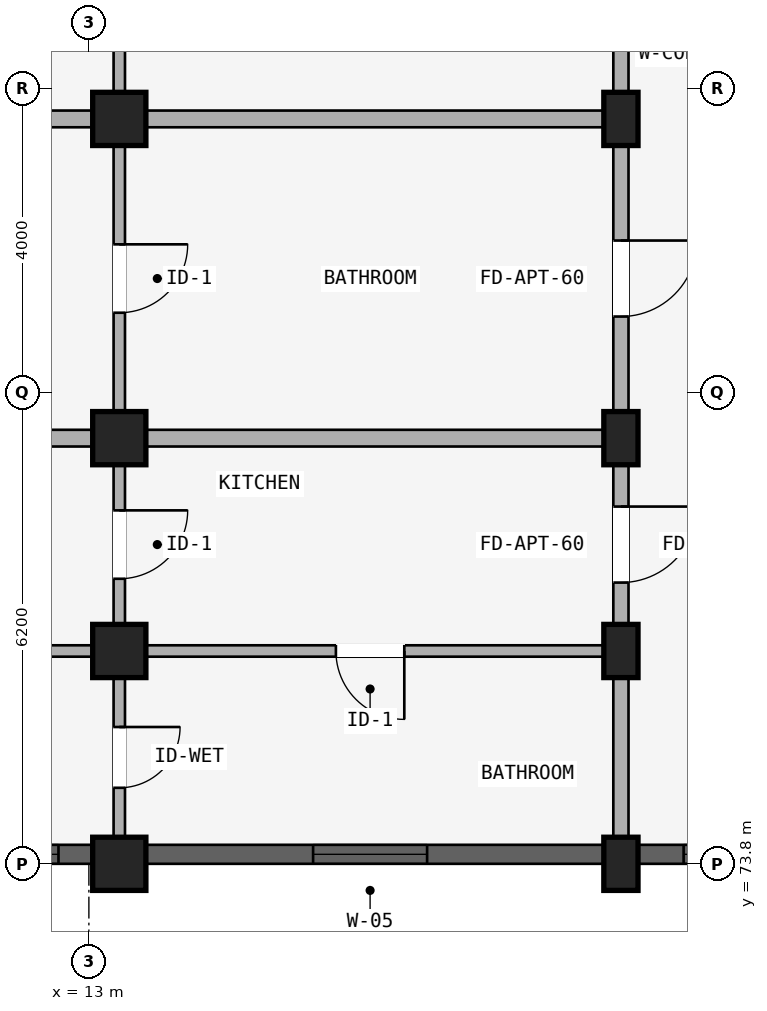
"""IFC4 building model, lengths in metres.
Left out: names, types, materials, properties, quantities, classifications, styles, units other than length and angle.
Written with IfcOpenShell. Run it as: python <this file> out.ifc"""

import sys

from ifc_helpers import new_model, si_unit, direction, frame, frame_2d, origin, origin_2d, place, context, subcontext, project, spatial, rectangle, extrude, element, fill, save


model = new_model("IFC4")
c1 = context("Model", 3, precision=1e-05, world=origin(), true_north=direction((0.0, 1.0)))
c2 = subcontext(c1, "Body", "Model", "MODEL_VIEW")
j1 = project(units=[si_unit("LENGTHUNIT", "METRE"), si_unit("PLANEANGLEUNIT", "RADIAN")], contexts=[c1])
p1 = place(None, origin())
s1 = spatial("IfcSite", under=j1, at=p1, CompositionType="ELEMENT")
p2 = place(p1, origin())
s2 = spatial("IfcBuilding", under=s1, at=p2, CompositionType="ELEMENT")
p3 = place(p2, frame((0.0, 0.0, 18.15)))
s3 = spatial("IfcBuildingStorey", under=s2, at=p3, CompositionType="ELEMENT", Elevation=18.15)
p4 = place(p3, frame((20.0, 83.6, 0.0), z_axis=(0.0, 0.0, 1.0), x_axis=(1.0, 0.0, 0.0)))
e1 = element("IfcColumn", 1, at=p4, inside=s3, PredefinedType="COLUMN", context=c2, shape_type="SweptSolid", body=[
    extrude(rectangle(XDim=0.45, YDim=0.7, at=origin_2d()), origin(), (0.0, 0.0, 1.0), 2.93),
])
p5 = place(p3, frame((13.4, 83.6, 0.0), z_axis=(0.0, 0.0, 1.0), x_axis=(1.0, 0.0, 0.0)))
e2 = element("IfcColumn", 2, at=p5, inside=s3, PredefinedType="COLUMN", context=c2, shape_type="SweptSolid", body=[
    extrude(rectangle(XDim=0.7, YDim=0.7, at=origin_2d()), origin(), (0.0, 0.0, 1.0), 2.93),
])
p6 = place(p3, frame((20.0, 79.4, 0.0), z_axis=(0.0, 0.0, 1.0), x_axis=(1.0, 0.0, 0.0)))
e3 = element("IfcColumn", 3, at=p6, inside=s3, PredefinedType="COLUMN", context=c2, shape_type="SweptSolid", body=[
    extrude(rectangle(XDim=0.45, YDim=0.7, at=origin_2d()), origin(), (0.0, 0.0, 1.0), 2.93),
])
p7 = place(p3, frame((13.4, 79.4, 0.0), z_axis=(0.0, 0.0, 1.0), x_axis=(1.0, 0.0, 0.0)))
e4 = element("IfcColumn", 4, at=p7, inside=s3, PredefinedType="COLUMN", context=c2, shape_type="SweptSolid", body=[
    extrude(rectangle(XDim=0.7, YDim=0.7, at=origin_2d()), origin(), (0.0, 0.0, 1.0), 2.93),
])
p8 = place(p3, frame((20.0, 76.6, 0.0), z_axis=(0.0, 0.0, 1.0), x_axis=(1.0, 0.0, 0.0)))
e5 = element("IfcColumn", 5, at=p8, inside=s3, PredefinedType="COLUMN", context=c2, shape_type="SweptSolid", body=[
    extrude(rectangle(XDim=0.45, YDim=0.7, at=origin_2d()), origin(), (0.0, 0.0, 1.0), 2.93),
])
p9 = place(p3, frame((13.4, 76.6, 0.0), z_axis=(0.0, 0.0, 1.0), x_axis=(1.0, 0.0, 0.0)))
e6 = element("IfcColumn", 6, at=p9, inside=s3, PredefinedType="COLUMN", context=c2, shape_type="SweptSolid", body=[
    extrude(rectangle(XDim=0.7, YDim=0.7, at=origin_2d()), origin(), (0.0, 0.0, 1.0), 2.93),
])
p10 = place(p3, frame((20.0, 73.8, 0.0), z_axis=(0.0, 0.0, 1.0), x_axis=(1.0, 0.0, 0.0)))
e7 = element("IfcColumn", 7, at=p10, inside=s3, PredefinedType="COLUMN", context=c2, shape_type="SweptSolid", body=[
    extrude(rectangle(XDim=0.45, YDim=0.7, at=origin_2d()), origin(), (0.0, 0.0, 1.0), 2.93),
])
p11 = place(p3, frame((13.4, 73.8, 0.0), z_axis=(0.0, 0.0, 1.0), x_axis=(1.0, 0.0, 0.0)))
e8 = element("IfcColumn", 8, at=p11, inside=s3, PredefinedType="COLUMN", context=c2, shape_type="SweptSolid", body=[
    extrude(rectangle(XDim=0.7, YDim=0.7, at=origin_2d()), origin(), (0.0, 0.0, 1.0), 2.93),
])
p12 = place(p3, frame((20.0, 87.65, 0.0), z_axis=(0.0, 0.0, 1.0), x_axis=(0.0, -1.0, 0.0)))
e9 = element("IfcWall", 9, at=p12, inside=s3, PredefinedType="STANDARD", context=c2, shape_type="SweptSolid", body=[
    extrude(rectangle(XDim=4.05, YDim=0.2, at=frame_2d((2.025, 0.0))), origin(), (0.0, 0.0, 1.0), 2.372),
])
p13 = place(p12, frame((1.525, 0.0, 0.0)))
e10 = element("IfcOpeningElement", 10, at=p13, cuts=e9, PredefinedType="OPENING", context=c2, shape_type="SweptSolid", body=[
    extrude(rectangle(XDim=1.0, YDim=2.15, at=frame_2d((0.5, 1.075))), frame((0.0, 0.11, 0.0), z_axis=(0.0, -1.0, 0.0), x_axis=(1.0, 0.0, 0.0)), (0.0, 0.0, 1.0), 0.22),
])
p14 = place(p3, frame((13.4, 87.57, 0.0), z_axis=(0.0, 0.0, 1.0), x_axis=(0.0, -1.0, 0.0)))
e11 = element("IfcWall", 11, at=p14, inside=s3, PredefinedType="PARTITIONING", context=c2, shape_type="SweptSolid", body=[
    extrude(rectangle(XDim=3.89, YDim=0.15, at=frame_2d((1.945, 0.0))), origin(), (0.0, 0.0, 1.0), 2.372),
])
p15 = place(p14, frame((1.495, 0.0, 0.0)))
e12 = element("IfcOpeningElement", 12, at=p15, cuts=e11, PredefinedType="OPENING", context=c2, shape_type="SweptSolid", body=[
    extrude(rectangle(XDim=0.9, YDim=2.1, at=frame_2d((0.45, 1.05))), frame((0.0, 0.085, 0.0), z_axis=(0.0, -1.0, 0.0), x_axis=(1.0, 0.0, 0.0)), (0.0, 0.0, 1.0), 0.17),
])
p16 = place(p3, frame((20.0, 83.6, 0.0), z_axis=(0.0, 0.0, 1.0), x_axis=(0.0, -1.0, 0.0)))
e13 = element("IfcWall", 13, at=p16, inside=s3, PredefinedType="STANDARD", context=c2, shape_type="SweptSolid", body=[
    extrude(rectangle(XDim=4.2, YDim=0.2, at=frame_2d((2.1, 0.0))), origin(), (0.0, 0.0, 1.0), 2.372),
])
p17 = place(p16, frame((1.6, 0.0, 0.0)))
e14 = element("IfcOpeningElement", 14, at=p17, cuts=e13, PredefinedType="OPENING", context=c2, shape_type="SweptSolid", body=[
    extrude(rectangle(XDim=1.0, YDim=2.15, at=frame_2d((0.5, 1.075))), frame((0.0, 0.11, 0.0), z_axis=(0.0, -1.0, 0.0), x_axis=(1.0, 0.0, 0.0)), (0.0, 0.0, 1.0), 0.22),
])
p18 = place(p3, frame((13.4, 83.52, 0.0), z_axis=(0.0, 0.0, 1.0), x_axis=(0.0, -1.0, 0.0)))
e15 = element("IfcWall", 15, at=p18, inside=s3, PredefinedType="PARTITIONING", context=c2, shape_type="SweptSolid", body=[
    extrude(rectangle(XDim=4.04, YDim=0.15, at=frame_2d((2.02, 0.0))), origin(), (0.0, 0.0, 1.0), 2.372),
])
p19 = place(p18, frame((1.57, 0.0, 0.0)))
e16 = element("IfcOpeningElement", 16, at=p19, cuts=e15, PredefinedType="OPENING", context=c2, shape_type="SweptSolid", body=[
    extrude(rectangle(XDim=0.9, YDim=2.1, at=frame_2d((0.45, 1.05))), frame((0.0, 0.085, 0.0), z_axis=(0.0, -1.0, 0.0), x_axis=(1.0, 0.0, 0.0)), (0.0, 0.0, 1.0), 0.17),
])
p20 = place(p3, frame((19.95, 83.6, 0.0), z_axis=(0.0, 0.0, 1.0), x_axis=(-1.0, 0.0, 0.0)))
e17 = element("IfcWall", 17, at=p20, inside=s3, PredefinedType="STANDARD", context=c2, shape_type="SweptSolid", body=[
    extrude(rectangle(XDim=17.53, YDim=0.22, at=frame_2d((8.765, 0.0))), origin(), (0.0, 0.0, 1.0), 2.372),
])
p21 = place(p3, frame((20.0, 79.4, 0.0), z_axis=(0.0, 0.0, 1.0), x_axis=(0.0, -1.0, 0.0)))
e18 = element("IfcWall", 18, at=p21, inside=s3, PredefinedType="STANDARD", context=c2, shape_type="SweptSolid", body=[
    extrude(rectangle(XDim=2.8, YDim=0.2, at=frame_2d((1.4, 0.0))), origin(), (0.0, 0.0, 1.0), 2.372),
])
p22 = place(p21, frame((0.9, 0.0, 0.0)))
e19 = element("IfcOpeningElement", 19, at=p22, cuts=e18, PredefinedType="OPENING", context=c2, shape_type="SweptSolid", body=[
    extrude(rectangle(XDim=1.0, YDim=2.15, at=frame_2d((0.5, 1.075))), frame((0.0, 0.11, 0.0), z_axis=(0.0, -1.0, 0.0), x_axis=(1.0, 0.0, 0.0)), (0.0, 0.0, 1.0), 0.22),
])
p23 = place(p3, frame((13.4, 79.32, 0.0), z_axis=(0.0, 0.0, 1.0), x_axis=(0.0, -1.0, 0.0)))
e20 = element("IfcWall", 20, at=p23, inside=s3, PredefinedType="PLUMBINGWALL", context=c2, shape_type="SweptSolid", body=[
    extrude(rectangle(XDim=2.64, YDim=0.15, at=frame_2d((1.32, 0.0))), origin(), (0.0, 0.0, 1.0), 2.372),
])
p24 = place(p23, frame((0.87, 0.0, 0.0)))
e21 = element("IfcOpeningElement", 21, at=p24, cuts=e20, PredefinedType="OPENING", context=c2, shape_type="SweptSolid", body=[
    extrude(rectangle(XDim=0.9, YDim=2.1, at=frame_2d((0.45, 1.05))), frame((0.0, 0.085, 0.0), z_axis=(0.0, -1.0, 0.0), x_axis=(1.0, 0.0, 0.0)), (0.0, 0.0, 1.0), 0.17),
])
p25 = place(p3, frame((19.9, 79.4, 0.0), z_axis=(0.0, 0.0, 1.0), x_axis=(-1.0, 0.0, 0.0)))
e22 = element("IfcWall", 22, at=p25, inside=s3, PredefinedType="STANDARD", context=c2, shape_type="SweptSolid", body=[
    extrude(rectangle(XDim=17.42, YDim=0.22, at=frame_2d((8.71, 0.0))), origin(), (0.0, 0.0, 1.0), 2.372),
])
p26 = place(p3, frame((20.0, 76.6, 0.0), z_axis=(0.0, 0.0, 1.0), x_axis=(0.0, -1.0, 0.0)))
e23 = element("IfcWall", 23, at=p26, inside=s3, PredefinedType="STANDARD", context=c2, shape_type="SweptSolid", body=[
    extrude(rectangle(XDim=2.8, YDim=0.2, at=frame_2d((1.4, 0.0))), origin(), (0.0, 0.0, 1.0), 2.372),
])
p27 = place(p3, frame((13.4, 76.52, 0.0), z_axis=(0.0, 0.0, 1.0), x_axis=(0.0, -1.0, 0.0)))
e24 = element("IfcWall", 24, at=p27, inside=s3, PredefinedType="PLUMBINGWALL", context=c2, shape_type="SweptSolid", body=[
    extrude(rectangle(XDim=2.64, YDim=0.15, at=frame_2d((1.32, 0.0))), origin(), (0.0, 0.0, 1.0), 2.372),
])
p28 = place(p27, frame((0.92, 0.0, 0.0)))
e25 = element("IfcOpeningElement", 25, at=p28, cuts=e24, PredefinedType="OPENING", context=c2, shape_type="SweptSolid", body=[
    extrude(rectangle(XDim=0.8, YDim=2.1, at=frame_2d((0.4, 1.05))), frame((0.0, 0.085, 0.0), z_axis=(0.0, -1.0, 0.0), x_axis=(1.0, 0.0, 0.0)), (0.0, 0.0, 1.0), 0.17),
])
p29 = place(p3, frame((19.9, 76.6, 0.0), z_axis=(0.0, 0.0, 1.0), x_axis=(-1.0, 0.0, 0.0)))
e26 = element("IfcWall", 26, at=p29, inside=s3, PredefinedType="PARTITIONING", context=c2, shape_type="SweptSolid", body=[
    extrude(rectangle(XDim=17.42, YDim=0.15, at=frame_2d((8.71, 0.0))), origin(), (0.0, 0.0, 1.0), 2.372),
])
p30 = place(p29, frame((2.75, 0.0, 0.0)))
e27 = element("IfcOpeningElement", 27, at=p30, cuts=e26, PredefinedType="OPENING", context=c2, shape_type="SweptSolid", body=[
    extrude(rectangle(XDim=0.9, YDim=2.1, at=frame_2d((0.45, 1.05))), frame((0.0, 0.085, 0.0), z_axis=(0.0, -1.0, 0.0), x_axis=(1.0, 0.0, 0.0)), (0.0, 0.0, 1.0), 0.17),
])
p31 = place(p3, frame((22.171, 73.925, 0.0), z_axis=(0.0, 0.0, 1.0), x_axis=(-1.0, 0.0, 0.0)))
e28 = element("IfcWall", 28, at=p31, inside=s3, PredefinedType="STANDARD", context=c2, shape_type="SweptSolid", body=[
    extrude(rectangle(XDim=1.943, YDim=0.25, at=frame_2d((0.971, 0.0))), origin(), (0.0, 0.0, 1.0), 2.372),
])
p32 = place(p31, frame((0.596, 0.0, 0.88)))
e29 = element("IfcOpeningElement", 29, at=p32, cuts=e28, PredefinedType="OPENING", context=c2, shape_type="SweptSolid", body=[
    extrude(rectangle(XDim=0.75, YDim=1.05, at=frame_2d((0.375, 0.525))), frame((0.0, 0.135, 0.0), z_axis=(0.0, -1.0, 0.0), x_axis=(1.0, 0.0, 0.0)), (0.0, 0.0, 1.0), 0.27),
])
p33 = place(p3, frame((19.771, 73.925, 0.0), z_axis=(0.0, 0.0, 1.0), x_axis=(-1.0, 0.0, 0.0)))
e30 = element("IfcWall", 30, at=p33, inside=s3, PredefinedType="STANDARD", context=c2, shape_type="SweptSolid", body=[
    extrude(rectangle(XDim=6.018, YDim=0.25, at=frame_2d((3.009, 0.0))), origin(), (0.0, 0.0, 1.0), 2.372),
])
p34 = place(p33, frame((2.322, 0.0, 0.522)))
e31 = element("IfcOpeningElement", 31, at=p34, cuts=e30, PredefinedType="OPENING", context=c2, shape_type="SweptSolid", body=[
    extrude(rectangle(XDim=1.5, YDim=1.65, at=frame_2d((0.75, 0.825))), frame((0.0, 0.135, 0.0), z_axis=(0.0, -1.0, 0.0), x_axis=(1.0, 0.0, 0.0)), (0.0, 0.0, 1.0), 0.27),
])
p35 = place(p3, frame((13.046, 73.925, 0.0), z_axis=(0.0, 0.0, 1.0), x_axis=(-1.0, 0.0, 0.0)))
e32 = element("IfcWall", 32, at=p35, inside=s3, PredefinedType="STANDARD", context=c2, shape_type="SweptSolid", body=[
    extrude(rectangle(XDim=2.093, YDim=0.25, at=frame_2d((1.046, 0.0))), origin(), (0.0, 0.0, 1.0), 2.372),
])
p36 = place(p35, frame((0.447, 0.0, 0.672)))
e33 = element("IfcOpeningElement", 33, at=p36, cuts=e32, PredefinedType="OPENING", context=c2, shape_type="SweptSolid", body=[
    extrude(rectangle(XDim=1.2, YDim=1.5, at=frame_2d((0.6, 0.75))), frame((0.0, 0.135, 0.0), z_axis=(0.0, -1.0, 0.0), x_axis=(1.0, 0.0, 0.0)), (0.0, 0.0, 1.0), 0.27),
])
p37 = place(p32, origin())
e34 = element("IfcWindow", 34, at=p37, inside=s3, PartitioningType="SINGLE_PANEL", PredefinedType="WINDOW", context=c2, shape_type="SweptSolid", body=[
    extrude(rectangle(XDim=0.75, YDim=1.05, at=frame_2d((0.375, 0.525))), frame((0.0, 0.03, 0.0), z_axis=(0.0, -1.0, 0.0), x_axis=(1.0, 0.0, 0.0)), (0.0, 0.0, 1.0), 0.06),
])
fill(e29, e34)
p38 = place(p34, origin())
e35 = element("IfcWindow", 35, at=p38, inside=s3, PartitioningType="DOUBLE_PANEL_VERTICAL", PredefinedType="WINDOW", context=c2, shape_type="SweptSolid", body=[
    extrude(rectangle(XDim=1.5, YDim=1.65, at=frame_2d((0.75, 0.825))), frame((0.0, 0.03, 0.0), z_axis=(0.0, -1.0, 0.0), x_axis=(1.0, 0.0, 0.0)), (0.0, 0.0, 1.0), 0.06),
])
fill(e31, e35)
p39 = place(p36, origin())
e36 = element("IfcWindow", 36, at=p39, inside=s3, PartitioningType="SINGLE_PANEL", PredefinedType="WINDOW", context=c2, shape_type="SweptSolid", body=[
    extrude(rectangle(XDim=1.2, YDim=1.5, at=frame_2d((0.6, 0.75))), frame((0.0, 0.03, 0.0), z_axis=(0.0, -1.0, 0.0), x_axis=(1.0, 0.0, 0.0)), (0.0, 0.0, 1.0), 0.06),
])
fill(e33, e36)
p40 = place(p17, origin())
e37 = element("IfcDoor", 37, at=p40, inside=s3, OperationType="SINGLE_SWING_LEFT", PredefinedType="DOOR", context=c2, shape_type="SweptSolid", body=[
    extrude(rectangle(XDim=1.0, YDim=2.15, at=frame_2d((0.5, 1.075))), frame((0.0, 0.025, 0.0), z_axis=(0.0, -1.0, 0.0), x_axis=(1.0, 0.0, 0.0)), (0.0, 0.0, 1.0), 0.05),
])
fill(e14, e37)
p41 = place(p19, frame((0.9, 0.0, 0.0), z_axis=(0.0, 0.0, 1.0), x_axis=(-1.0, 0.0, 0.0)))
e38 = element("IfcDoor", 38, at=p41, inside=s3, OperationType="SINGLE_SWING_RIGHT", PredefinedType="DOOR", context=c2, shape_type="SweptSolid", body=[
    extrude(rectangle(XDim=0.9, YDim=2.1, at=frame_2d((0.45, 1.05))), frame((0.0, 0.025, 0.0), z_axis=(0.0, -1.0, 0.0), x_axis=(1.0, 0.0, 0.0)), (0.0, 0.0, 1.0), 0.05),
])
fill(e16, e38)
p42 = place(p24, frame((0.9, 0.0, 0.0), z_axis=(0.0, 0.0, 1.0), x_axis=(-1.0, 0.0, 0.0)))
e39 = element("IfcDoor", 39, at=p42, inside=s3, OperationType="SINGLE_SWING_RIGHT", PredefinedType="DOOR", context=c2, shape_type="SweptSolid", body=[
    extrude(rectangle(XDim=0.9, YDim=2.1, at=frame_2d((0.45, 1.05))), frame((0.0, 0.025, 0.0), z_axis=(0.0, -1.0, 0.0), x_axis=(1.0, 0.0, 0.0)), (0.0, 0.0, 1.0), 0.05),
])
fill(e21, e39)
p43 = place(p22, origin())
e40 = element("IfcDoor", 40, at=p43, inside=s3, OperationType="SINGLE_SWING_LEFT", PredefinedType="DOOR", context=c2, shape_type="SweptSolid", body=[
    extrude(rectangle(XDim=1.0, YDim=2.15, at=frame_2d((0.5, 1.075))), frame((0.0, 0.025, 0.0), z_axis=(0.0, -1.0, 0.0), x_axis=(1.0, 0.0, 0.0)), (0.0, 0.0, 1.0), 0.05),
])
fill(e19, e40)
p44 = place(p28, frame((0.8, 0.0, 0.0), z_axis=(0.0, 0.0, 1.0), x_axis=(-1.0, 0.0, 0.0)))
e41 = element("IfcDoor", 41, at=p44, inside=s3, OperationType="SINGLE_SWING_RIGHT", PredefinedType="DOOR", context=c2, shape_type="SweptSolid", body=[
    extrude(rectangle(XDim=0.8, YDim=2.1, at=frame_2d((0.4, 1.05))), frame((0.0, 0.025, 0.0), z_axis=(0.0, -1.0, 0.0), x_axis=(1.0, 0.0, 0.0)), (0.0, 0.0, 1.0), 0.05),
])
fill(e25, e41)
p45 = place(p30, frame((0.9, 0.0, 0.0), z_axis=(0.0, 0.0, 1.0), x_axis=(-1.0, 0.0, 0.0)))
e42 = element("IfcDoor", 42, at=p45, inside=s3, OperationType="SINGLE_SWING_RIGHT", PredefinedType="DOOR", context=c2, shape_type="SweptSolid", body=[
    extrude(rectangle(XDim=0.9, YDim=2.1, at=frame_2d((0.45, 1.05))), frame((0.0, 0.025, 0.0), z_axis=(0.0, -1.0, 0.0), x_axis=(1.0, 0.0, 0.0)), (0.0, 0.0, 1.0), 0.05),
])
fill(e27, e42)
save(model, sys.argv[1])
